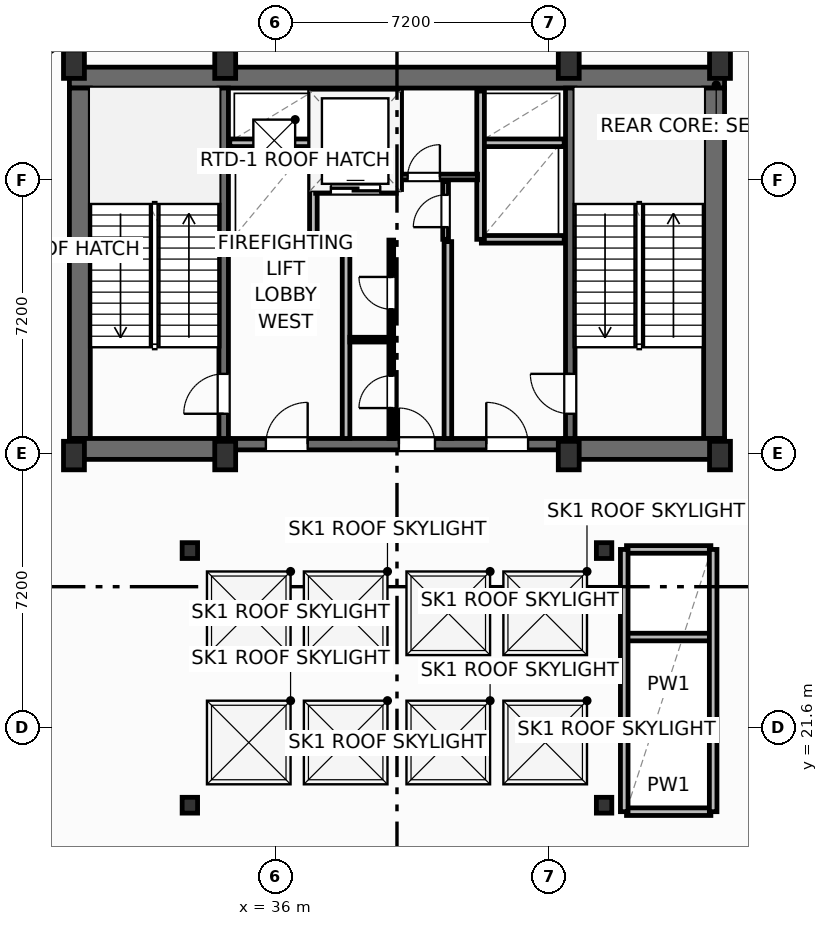
"""IFC4 building model, lengths in metres.
Left out: names, types, materials, properties, quantities, classifications, styles, units other than length and angle.
Written with IfcOpenShell. Run it as: python <this file> out.ifc"""

import sys

from ifc_helpers import new_model, si_unit, direction, frame, frame_2d, origin, origin_2d, place, context, subcontext, project, spatial, rectangle, i_section, extrude, element, fill, save


model = new_model("IFC4")
c1 = context("Model", 3, precision=1e-05, world=origin(), true_north=direction((0.0, 1.0)))
c2 = subcontext(c1, "Body", "Model", "MODEL_VIEW")
j1 = project(units=[si_unit("LENGTHUNIT", "METRE"), si_unit("PLANEANGLEUNIT", "RADIAN")], contexts=[c1])
p1 = place(None, origin())
s1 = spatial("IfcSite", under=j1, at=p1, CompositionType="ELEMENT")
p2 = place(p1, origin())
s2 = spatial("IfcBuilding", under=s1, at=p2, CompositionType="ELEMENT")
p3 = place(p2, frame((0.0, 0.0, 301.1)))
s3 = spatial("IfcBuildingStorey", under=s2, at=p3, CompositionType="ELEMENT", Elevation=301.1)
for number, where, z_axis, x_axis in (
    (1, (30.7, 28.75, 0.0), (0.0, 0.0, 1.0), (1.0, 0.0, 0.0)),
    (2, (34.68, 28.75, 0.0), (0.0, 0.0, 1.0), (1.0, 0.0, 0.0)),
    (3, (43.72, 28.75, 0.0), (0.0, 0.0, 1.0), (1.0, 0.0, 0.0)),
    (4, (47.7, 28.75, 0.0), (0.0, 0.0, 1.0), (1.0, 0.0, 0.0)),
    (5, (30.7, 39.05, 0.0), (0.0, 0.0, 1.0), (1.0, 0.0, 0.0)),
    (6, (34.68, 39.05, 0.0), (0.0, 0.0, 1.0), (1.0, 0.0, 0.0)),
    (7, (43.72, 39.05, 0.0), (0.0, 0.0, 1.0), (1.0, 0.0, 0.0)),
    (8, (47.7, 39.05, 0.0), (0.0, 0.0, 1.0), (1.0, 0.0, 0.0)),
):
    element("IfcColumn", number, at=place(p3, frame(where, z_axis=z_axis, x_axis=x_axis)), inside=s3, PredefinedType="COLUMN", context=c2, shape_type="SweptSolid", body=[
        extrude(rectangle(XDim=0.55, YDim=0.75, at=origin_2d()), origin(), (0.0, 0.0, 1.0), 4.8),
    ])
for number, where, z_axis, x_axis in (
    (9, (33.75, 19.55, 0.0), (0.0, 0.0, 1.0), (1.0, 0.0, 0.0)),
    (10, (44.65, 19.55, 0.0), (0.0, 0.0, 1.0), (1.0, 0.0, 0.0)),
    (11, (33.75, 26.25, 0.0), (0.0, 0.0, 1.0), (1.0, 0.0, 0.0)),
    (12, (44.65, 26.25, 0.0), (0.0, 0.0, 1.0), (1.0, 0.0, 0.0)),
):
    element("IfcColumn", number, at=place(p3, frame(where, z_axis=z_axis, x_axis=x_axis)), inside=s3, PredefinedType="COLUMN", context=c2, shape_type="SweptSolid", body=[
        extrude(i_section(OverallWidth=0.406, OverallDepth=0.416, WebThickness=0.03, FlangeThickness=0.048, FilletRadius=0.025, at=origin_2d()), origin(), (0.0, 0.0, 1.0), 4.8),
    ])
p4 = place(p3, frame((30.58, 38.695, 0.0), z_axis=(0.0, 0.0, 1.0), x_axis=(1.0, 0.0, 0.0)))
e13 = element("IfcWall", 13, at=p4, inside=s3, PredefinedType="SHEAR", context=c2, shape_type="SweptSolid", body=[
    extrude(rectangle(XDim=17.24, YDim=0.55, at=frame_2d((8.62, 0.0))), origin(), (0.0, 0.0, 1.0), 4.55),
])
for number, where, z_axis, x_axis in (
    (14, (30.855, 29.2, 0.0), (0.0, 0.0, 1.0), (0.0, 1.0, 0.0)),
    (15, (47.545, 29.2, 0.0), (0.0, 0.0, 1.0), (0.0, 1.0, 0.0)),
):
    element("IfcWall", number, at=place(p3, frame(where, z_axis=z_axis, x_axis=x_axis)), inside=s3, PredefinedType="SHEAR", context=c2, shape_type="SweptSolid", body=[
        extrude(rectangle(XDim=9.22, YDim=0.55, at=frame_2d((4.61, 0.0))), origin(), (0.0, 0.0, 1.0), 4.55),
    ])
for number, where, z_axis, x_axis in (
    (16, (30.58, 28.925, 0.0), (0.0, 0.0, 1.0), (1.0, 0.0, 0.0)),
    (17, (43.6, 28.925, 0.0), (0.0, 0.0, 1.0), (1.0, 0.0, 0.0)),
):
    element("IfcWall", number, at=place(p3, frame(where, z_axis=z_axis, x_axis=x_axis)), inside=s3, PredefinedType="SHEAR", context=c2, shape_type="SweptSolid", body=[
        extrude(rectangle(XDim=4.22, YDim=0.55, at=frame_2d((2.11, 0.0))), origin(), (0.0, 0.0, 1.0), 4.55),
    ])
p5 = place(p3, frame((34.8, 29.05, 0.0), z_axis=(0.0, 0.0, 1.0), x_axis=(1.0, 0.0, 0.0)))
e18 = element("IfcWall", 18, at=p5, inside=s3, PredefinedType="SHEAR", context=c2, shape_type="SweptSolid", body=[
    extrude(rectangle(XDim=8.8, YDim=0.3, at=frame_2d((4.4, 0.0))), origin(), (0.0, 0.0, 1.0), 4.55),
])
p6 = place(p5, frame((0.95, 0.0, 0.0)))
e19 = element("IfcOpeningElement", 19, at=p6, cuts=e18, PredefinedType="OPENING", context=c2, shape_type="SweptSolid", body=[
    extrude(rectangle(XDim=1.1, YDim=2.15, at=frame_2d((0.55, 1.075))), frame((0.0, 0.16, 0.0), z_axis=(0.0, -1.0, 0.0), x_axis=(1.0, 0.0, 0.0)), (0.0, 0.0, 1.0), 0.32),
])
p7 = place(p5, frame((6.75, 0.0, 0.0)))
e20 = element("IfcOpeningElement", 20, at=p7, cuts=e18, PredefinedType="OPENING", context=c2, shape_type="SweptSolid", body=[
    extrude(rectangle(XDim=1.1, YDim=2.15, at=frame_2d((0.55, 1.075))), frame((0.0, 0.16, 0.0), z_axis=(0.0, -1.0, 0.0), x_axis=(1.0, 0.0, 0.0)), (0.0, 0.0, 1.0), 0.32),
])
p8 = place(p5, frame((4.45, 0.0, 0.0)))
e21 = element("IfcOpeningElement", 21, at=p8, cuts=e18, PredefinedType="OPENING", context=c2, shape_type="SweptSolid", body=[
    extrude(rectangle(XDim=0.95, YDim=2.15, at=frame_2d((0.475, 1.075))), frame((0.0, 0.16, 0.0), z_axis=(0.0, -1.0, 0.0), x_axis=(1.0, 0.0, 0.0)), (0.0, 0.0, 1.0), 0.32),
])
p9 = place(p3, frame((34.64, 29.2, 0.0), z_axis=(0.0, 0.0, 1.0), x_axis=(0.0, 1.0, 0.0)))
e22 = element("IfcWall", 22, at=p9, inside=s3, PredefinedType="SHEAR", context=c2, shape_type="SweptSolid", body=[
    extrude(rectangle(XDim=9.22, YDim=0.25, at=frame_2d((4.61, 0.0))), origin(), (0.0, 0.0, 1.0), 4.55),
])
p10 = place(p9, frame((0.65, 0.0, 0.0)))
e23 = element("IfcOpeningElement", 23, at=p10, cuts=e22, PredefinedType="OPENING", context=c2, shape_type="SweptSolid", body=[
    extrude(rectangle(XDim=1.05, YDim=2.15, at=frame_2d((0.525, 1.075))), frame((0.0, 0.135, 0.0), z_axis=(0.0, -1.0, 0.0), x_axis=(1.0, 0.0, 0.0)), (0.0, 0.0, 1.0), 0.27),
])
p11 = place(p3, frame((43.76, 29.2, 0.0), z_axis=(0.0, 0.0, 1.0), x_axis=(0.0, 1.0, 0.0)))
e24 = element("IfcWall", 24, at=p11, inside=s3, PredefinedType="SHEAR", context=c2, shape_type="SweptSolid", body=[
    extrude(rectangle(XDim=9.22, YDim=0.25, at=frame_2d((4.61, 0.0))), origin(), (0.0, 0.0, 1.0), 4.55),
])
p12 = place(p11, frame((0.65, 0.0, 0.0)))
e25 = element("IfcOpeningElement", 25, at=p12, cuts=e24, PredefinedType="OPENING", context=c2, shape_type="SweptSolid", body=[
    extrude(rectangle(XDim=1.05, YDim=2.15, at=frame_2d((0.525, 1.075))), frame((0.0, 0.135, 0.0), z_axis=(0.0, -1.0, 0.0), x_axis=(1.0, 0.0, 0.0)), (0.0, 0.0, 1.0), 0.27),
])
p13 = place(p3, frame((33.952, 1.188, 0.0), z_axis=(0.0, 0.0, 1.0), x_axis=(0.823534980344, 0.567265490005, 0.0)))
e26 = element("IfcWall", 26, at=p13, inside=s3, PredefinedType="SOLIDWALL", context=c2, shape_type="SweptSolid", body=[
    extrude(rectangle(XDim=36.01, YDim=0.24, at=frame_2d((18.005, 0.0))), origin(), (0.0, 0.0, 1.0), 3.83),
])
p14 = place(p3, frame((44.448, 49.412, 0.0), z_axis=(0.0, 0.0, 1.0), x_axis=(-0.823531813074, -0.567270088102, 0.0)))
e27 = element("IfcWall", 27, at=p14, inside=s3, PredefinedType="SOLIDWALL", context=c2, shape_type="SweptSolid", body=[
    extrude(rectangle(XDim=36.01, YDim=0.24, at=frame_2d((18.005, 0.0))), origin(), (0.0, 0.0, 1.0), 3.83),
])
for number, where, z_axis, x_axis in (
    (28, (37.86, 29.2, 0.0), (0.0, 0.0, 1.0), (0.0, 1.0, 0.0)),
    (29, (40.54, 29.2, 0.0), (0.0, 0.0, 1.0), (0.0, 1.0, 0.0)),
):
    element("IfcWall", number, at=place(p3, frame(where, z_axis=z_axis, x_axis=x_axis)), inside=s3, PredefinedType="PARTITIONING", context=c2, shape_type="SweptSolid", body=[
        extrude(rectangle(XDim=5.18, YDim=0.2, at=frame_2d((2.59, 0.0))), origin(), (0.0, 0.0, 1.0), 4.55),
    ])
for number, where, z_axis, x_axis in (
    (30, (34.8, 34.44, 0.0), (0.0, 0.0, 1.0), (1.0, 0.0, 0.0)),
    (31, (34.8, 36.98, 0.0), (0.0, 0.0, 1.0), (1.0, 0.0, 0.0)),
):
    element("IfcWall", number, at=place(p3, frame(where, z_axis=z_axis, x_axis=x_axis)), inside=s3, PredefinedType="PARTITIONING", context=c2, shape_type="SweptSolid", body=[
        extrude(rectangle(XDim=2.18, YDim=0.2, at=frame_2d((1.09, 0.0))), origin(), (0.0, 0.0, 1.0), 4.55),
    ])
p15 = place(p3, frame((37.0, 34.44, 0.0), z_axis=(0.0, 0.0, 1.0), x_axis=(0.0, 1.0, 0.0)))
e32 = element("IfcWall", 32, at=p15, inside=s3, PredefinedType="PARTITIONING", context=c2, shape_type="SweptSolid", body=[
    extrude(rectangle(XDim=3.9, YDim=0.2, at=frame_2d((1.95, 0.0))), origin(), (0.0, 0.0, 1.0), 4.55),
])
for number, where, z_axis, x_axis in (
    (33, (41.42, 34.44, 0.0), (0.0, 0.0, 1.0), (1.0, 0.0, 0.0)),
    (34, (41.42, 36.98, 0.0), (0.0, 0.0, 1.0), (1.0, 0.0, 0.0)),
):
    element("IfcWall", number, at=place(p3, frame(where, z_axis=z_axis, x_axis=x_axis)), inside=s3, PredefinedType="PARTITIONING", context=c2, shape_type="SweptSolid", body=[
        extrude(rectangle(XDim=2.18, YDim=0.2, at=frame_2d((1.09, 0.0))), origin(), (0.0, 0.0, 1.0), 4.55),
    ])
p16 = place(p3, frame((41.4, 34.44, 0.0), z_axis=(0.0, 0.0, 1.0), x_axis=(0.0, 1.0, 0.0)))
e35 = element("IfcWall", 35, at=p16, inside=s3, PredefinedType="PARTITIONING", context=c2, shape_type="SweptSolid", body=[
    extrude(rectangle(XDim=3.9, YDim=0.2, at=frame_2d((1.95, 0.0))), origin(), (0.0, 0.0, 1.0), 4.55),
])
p17 = place(p3, frame((37.06, 35.75, 0.0), z_axis=(0.0, 0.0, 1.0), x_axis=(1.0, 0.0, 0.0)))
e36 = element("IfcWall", 36, at=p17, inside=s3, PredefinedType="PARTITIONING", context=c2, shape_type="SweptSolid", body=[
    extrude(rectangle(XDim=2.12, YDim=0.2, at=frame_2d((1.06, 0.0))), origin(), (0.0, 0.0, 1.0), 4.55),
])
p18 = place(p17, frame((0.4, 0.0, 0.0)))
e37 = element("IfcOpeningElement", 37, at=p18, cuts=e36, PredefinedType="OPENING", context=c2, shape_type="SweptSolid", body=[
    extrude(rectangle(XDim=1.3, YDim=2.2, at=frame_2d((0.65, 1.1))), frame((0.0, 0.11, 0.0), z_axis=(0.0, -1.0, 0.0), x_axis=(1.0, 0.0, 0.0)), (0.0, 0.0, 1.0), 0.22),
])
p19 = place(p3, frame((39.22, 35.75, 0.0), z_axis=(0.0, 0.0, 1.0), x_axis=(0.0, 1.0, 0.0)))
e38 = element("IfcWall", 38, at=p19, inside=s3, PredefinedType="PARTITIONING", context=c2, shape_type="SweptSolid", body=[
    extrude(rectangle(XDim=2.59, YDim=0.2, at=frame_2d((1.295, 0.0))), origin(), (0.0, 0.0, 1.0), 4.55),
])
p20 = place(p3, frame((39.3, 36.08, 0.0), z_axis=(0.0, 0.0, 1.0), x_axis=(1.0, 0.0, 0.0)))
e39 = element("IfcWall", 39, at=p20, inside=s3, PredefinedType="PARTITIONING", context=c2, shape_type="SweptSolid", body=[
    extrude(rectangle(XDim=2.02, YDim=0.15, at=frame_2d((1.01, 0.0))), origin(), (0.0, 0.0, 1.0), 4.55),
])
p21 = place(p20, frame((0.18, 0.0, 0.0)))
e40 = element("IfcOpeningElement", 40, at=p21, cuts=e39, PredefinedType="OPENING", context=c2, shape_type="SweptSolid", body=[
    extrude(rectangle(XDim=0.85, YDim=2.05, at=frame_2d((0.425, 1.025))), frame((0.0, 0.085, 0.0), z_axis=(0.0, -1.0, 0.0), x_axis=(1.0, 0.0, 0.0)), (0.0, 0.0, 1.0), 0.17),
])
p22 = place(p3, frame((40.48, 34.44, 0.0), z_axis=(0.0, 0.0, 1.0), x_axis=(0.0, 1.0, 0.0)))
e41 = element("IfcWall", 41, at=p22, inside=s3, PredefinedType="PARTITIONING", context=c2, shape_type="SweptSolid", body=[
    extrude(rectangle(XDim=1.52, YDim=0.15, at=frame_2d((0.76, 0.0))), origin(), (0.0, 0.0, 1.0), 4.55),
])
p23 = place(p22, frame((0.32, 0.0, 0.0)))
e42 = element("IfcOpeningElement", 42, at=p23, cuts=e41, PredefinedType="OPENING", context=c2, shape_type="SweptSolid", body=[
    extrude(rectangle(XDim=0.85, YDim=2.05, at=frame_2d((0.425, 1.025))), frame((0.0, 0.085, 0.0), z_axis=(0.0, -1.0, 0.0), x_axis=(1.0, 0.0, 0.0)), (0.0, 0.0, 1.0), 0.17),
])
p24 = place(p3, frame((37.96, 31.8, 0.0), z_axis=(0.0, 0.0, 1.0), x_axis=(1.0, 0.0, 0.0)))
e43 = element("IfcWall", 43, at=p24, inside=s3, PredefinedType="PARTITIONING", context=c2, shape_type="SweptSolid", body=[
    extrude(rectangle(XDim=1.09, YDim=0.125, at=frame_2d((0.545, 0.0))), origin(), (0.0, 0.0, 1.0), 4.55),
])
p25 = place(p3, frame((39.05, 29.2, 0.0), z_axis=(0.0, 0.0, 1.0), x_axis=(0.0, 1.0, 0.0)))
e44 = element("IfcWall", 44, at=p25, inside=s3, PredefinedType="PARTITIONING", context=c2, shape_type="SweptSolid", body=[
    extrude(rectangle(XDim=5.22, YDim=0.125, at=frame_2d((2.61, 0.0))), origin(), (0.0, 0.0, 1.0), 4.55),
])
p26 = place(p25, frame((0.8, 0.0, 0.0)))
e45 = element("IfcOpeningElement", 45, at=p26, cuts=e44, PredefinedType="OPENING", context=c2, shape_type="SweptSolid", body=[
    extrude(rectangle(XDim=0.85, YDim=2.05, at=frame_2d((0.425, 1.025))), frame((0.0, 0.073, 0.0), z_axis=(0.0, -1.0, 0.0), x_axis=(1.0, 0.0, 0.0)), (0.0, 0.0, 1.0), 0.145),
])
p27 = place(p25, frame((3.4, 0.0, 0.0)))
e46 = element("IfcOpeningElement", 46, at=p27, cuts=e44, PredefinedType="OPENING", context=c2, shape_type="SweptSolid", body=[
    extrude(rectangle(XDim=0.85, YDim=2.05, at=frame_2d((0.425, 1.025))), frame((0.0, 0.073, 0.0), z_axis=(0.0, -1.0, 0.0), x_axis=(1.0, 0.0, 0.0)), (0.0, 0.0, 1.0), 0.145),
])
for number, where, z_axis, x_axis in (
    (47, (45.24, 21.675, 0.0), (0.0, 0.0, 1.0), (1.0, 0.0, 0.0)),
    (48, (45.24, 23.975, 0.0), (0.0, 0.0, 1.0), (1.0, 0.0, 0.0)),
    (49, (45.24, 19.38, 0.0), (0.0, 0.0, 1.0), (1.0, 0.0, 0.0)),
    (50, (45.24, 26.28, 0.0), (0.0, 0.0, 1.0), (1.0, 0.0, 0.0)),
):
    element("IfcWall", number, at=place(p3, frame(where, z_axis=z_axis, x_axis=x_axis)), inside=s3, PredefinedType="PARTITIONING", context=c2, shape_type="SweptSolid", body=[
        extrude(rectangle(XDim=2.22, YDim=0.2, at=frame_2d((1.11, 0.0))), origin(), (0.0, 0.0, 1.0), 4.55),
    ])
for number, where, z_axis, x_axis in (
    (51, (45.18, 19.38, 0.0), (0.0, 0.0, 1.0), (0.0, 1.0, 0.0)),
    (52, (47.52, 19.38, 0.0), (0.0, 0.0, 1.0), (0.0, 1.0, 0.0)),
):
    element("IfcWall", number, at=place(p3, frame(where, z_axis=z_axis, x_axis=x_axis)), inside=s3, PredefinedType="PARTITIONING", context=c2, shape_type="SweptSolid", body=[
        extrude(rectangle(XDim=6.9, YDim=0.2, at=frame_2d((3.45, 0.0))), origin(), (0.0, 0.0, 1.0), 4.55),
    ])
p28 = place(p3, frame((0.0, 0.0, -0.25)))
p29 = place(p28, frame((35.3, 21.2, 0.0)))
p30 = place(p29, frame((0.0, 0.0, 0.2)))
e53 = element("IfcWindow", 53, at=p30, inside=s3, PartitioningType="SINGLE_PANEL", PredefinedType="SKYLIGHT", context=c2, shape_type="SweptSolid", body=[
    extrude(rectangle(XDim=2.2, YDim=2.2, at=origin_2d()), origin(), (0.0, 0.0, 1.0), 0.05),
])
p31 = place(p28, frame((37.85, 21.2, 0.0)))
p32 = place(p31, frame((0.0, 0.0, 0.2)))
e54 = element("IfcWindow", 54, at=p32, inside=s3, PartitioningType="SINGLE_PANEL", PredefinedType="SKYLIGHT", context=c2, shape_type="SweptSolid", body=[
    extrude(rectangle(XDim=2.2, YDim=2.2, at=origin_2d()), origin(), (0.0, 0.0, 1.0), 0.05),
])
p33 = place(p28, frame((40.55, 21.2, 0.0)))
p34 = place(p33, frame((0.0, 0.0, 0.2)))
e55 = element("IfcWindow", 55, at=p34, inside=s3, PartitioningType="SINGLE_PANEL", PredefinedType="SKYLIGHT", context=c2, shape_type="SweptSolid", body=[
    extrude(rectangle(XDim=2.2, YDim=2.2, at=origin_2d()), origin(), (0.0, 0.0, 1.0), 0.05),
])
p35 = place(p28, frame((43.1, 21.2, 0.0)))
p36 = place(p35, frame((0.0, 0.0, 0.2)))
e56 = element("IfcWindow", 56, at=p36, inside=s3, PartitioningType="SINGLE_PANEL", PredefinedType="SKYLIGHT", context=c2, shape_type="SweptSolid", body=[
    extrude(rectangle(XDim=2.2, YDim=2.2, at=origin_2d()), origin(), (0.0, 0.0, 1.0), 0.05),
])
p37 = place(p28, frame((35.3, 24.6, 0.0)))
p38 = place(p37, frame((0.0, 0.0, 0.2)))
e57 = element("IfcWindow", 57, at=p38, inside=s3, PartitioningType="SINGLE_PANEL", PredefinedType="SKYLIGHT", context=c2, shape_type="SweptSolid", body=[
    extrude(rectangle(XDim=2.2, YDim=2.2, at=origin_2d()), origin(), (0.0, 0.0, 1.0), 0.05),
])
p39 = place(p28, frame((37.85, 24.6, 0.0)))
p40 = place(p39, frame((0.0, 0.0, 0.2)))
e58 = element("IfcWindow", 58, at=p40, inside=s3, PartitioningType="SINGLE_PANEL", PredefinedType="SKYLIGHT", context=c2, shape_type="SweptSolid", body=[
    extrude(rectangle(XDim=2.2, YDim=2.2, at=origin_2d()), origin(), (0.0, 0.0, 1.0), 0.05),
])
p41 = place(p28, frame((40.55, 24.6, 0.0)))
p42 = place(p41, frame((0.0, 0.0, 0.2)))
e59 = element("IfcWindow", 59, at=p42, inside=s3, PartitioningType="SINGLE_PANEL", PredefinedType="SKYLIGHT", context=c2, shape_type="SweptSolid", body=[
    extrude(rectangle(XDim=2.2, YDim=2.2, at=origin_2d()), origin(), (0.0, 0.0, 1.0), 0.05),
])
p43 = place(p28, frame((43.1, 24.6, 0.0)))
p44 = place(p43, frame((0.0, 0.0, 0.2)))
e60 = element("IfcWindow", 60, at=p44, inside=s3, PartitioningType="SINGLE_PANEL", PredefinedType="SKYLIGHT", context=c2, shape_type="SweptSolid", body=[
    extrude(rectangle(XDim=2.2, YDim=2.2, at=origin_2d()), origin(), (0.0, 0.0, 1.0), 0.05),
])
p45 = place(p28, frame((35.97, 37.04, 0.0)))
p46 = place(p45, frame((0.0, 0.0, 0.2)))
e61 = element("IfcDoor", 61, at=p46, inside=s3, OperationType="SINGLE_SWING_LEFT", PredefinedType="TRAPDOOR", context=c2, shape_type="SweptSolid", body=[
    extrude(rectangle(XDim=1.1, YDim=1.1, at=origin_2d()), origin(), (0.0, 0.0, 1.0), 0.05),
])
p47 = place(p10, origin())
e62 = element("IfcDoor", 62, at=p47, inside=s3, OperationType="SINGLE_SWING_LEFT", PredefinedType="DOOR", context=c2, shape_type="SweptSolid", body=[
    extrude(rectangle(XDim=1.05, YDim=2.15, at=frame_2d((0.525, 1.075))), frame((0.0, 0.025, 0.0), z_axis=(0.0, -1.0, 0.0), x_axis=(1.0, 0.0, 0.0)), (0.0, 0.0, 1.0), 0.05),
])
fill(e23, e62)
p48 = place(p12, origin())
e63 = element("IfcDoor", 63, at=p48, inside=s3, OperationType="SINGLE_SWING_RIGHT", PredefinedType="DOOR", context=c2, shape_type="SweptSolid", body=[
    extrude(rectangle(XDim=1.05, YDim=2.15, at=frame_2d((0.525, 1.075))), frame((0.0, 0.025, 0.0), z_axis=(0.0, -1.0, 0.0), x_axis=(1.0, 0.0, 0.0)), (0.0, 0.0, 1.0), 0.05),
])
fill(e25, e63)
p49 = place(p6, origin())
e64 = element("IfcDoor", 64, at=p49, inside=s3, OperationType="SINGLE_SWING_RIGHT", PredefinedType="DOOR", context=c2, shape_type="SweptSolid", body=[
    extrude(rectangle(XDim=1.1, YDim=2.15, at=frame_2d((0.55, 1.075))), frame((0.0, 0.025, 0.0), z_axis=(0.0, -1.0, 0.0), x_axis=(1.0, 0.0, 0.0)), (0.0, 0.0, 1.0), 0.05),
])
fill(e19, e64)
p50 = place(p7, origin())
e65 = element("IfcDoor", 65, at=p50, inside=s3, OperationType="SINGLE_SWING_LEFT", PredefinedType="DOOR", context=c2, shape_type="SweptSolid", body=[
    extrude(rectangle(XDim=1.1, YDim=2.15, at=frame_2d((0.55, 1.075))), frame((0.0, 0.025, 0.0), z_axis=(0.0, -1.0, 0.0), x_axis=(1.0, 0.0, 0.0)), (0.0, 0.0, 1.0), 0.05),
])
fill(e20, e65)
p51 = place(p18, origin())
e66 = element("IfcDoor", 66, at=p51, inside=s3, OperationType="SLIDING_TO_LEFT", PredefinedType="DOOR", context=c2, shape_type="SweptSolid", body=[
    extrude(rectangle(XDim=1.3, YDim=2.2, at=frame_2d((0.65, 1.1))), frame((0.0, 0.025, 0.0), z_axis=(0.0, -1.0, 0.0), x_axis=(1.0, 0.0, 0.0)), (0.0, 0.0, 1.0), 0.05),
])
fill(e37, e66)
p52 = place(p21, origin())
e67 = element("IfcDoor", 67, at=p52, inside=s3, OperationType="SINGLE_SWING_RIGHT", PredefinedType="DOOR", context=c2, shape_type="SweptSolid", body=[
    extrude(rectangle(XDim=0.85, YDim=2.05, at=frame_2d((0.425, 1.025))), frame((0.0, 0.025, 0.0), z_axis=(0.0, -1.0, 0.0), x_axis=(1.0, 0.0, 0.0)), (0.0, 0.0, 1.0), 0.05),
])
fill(e40, e67)
p53 = place(p23, origin())
e68 = element("IfcDoor", 68, at=p53, inside=s3, OperationType="SINGLE_SWING_LEFT", PredefinedType="DOOR", context=c2, shape_type="SweptSolid", body=[
    extrude(rectangle(XDim=0.85, YDim=2.05, at=frame_2d((0.425, 1.025))), frame((0.0, 0.025, 0.0), z_axis=(0.0, -1.0, 0.0), x_axis=(1.0, 0.0, 0.0)), (0.0, 0.0, 1.0), 0.05),
])
fill(e42, e68)
p54 = place(p26, origin())
e69 = element("IfcDoor", 69, at=p54, inside=s3, OperationType="SINGLE_SWING_LEFT", PredefinedType="DOOR", context=c2, shape_type="SweptSolid", body=[
    extrude(rectangle(XDim=0.85, YDim=2.05, at=frame_2d((0.425, 1.025))), frame((0.0, 0.025, 0.0), z_axis=(0.0, -1.0, 0.0), x_axis=(1.0, 0.0, 0.0)), (0.0, 0.0, 1.0), 0.05),
])
fill(e45, e69)
p55 = place(p27, origin())
e70 = element("IfcDoor", 70, at=p55, inside=s3, OperationType="SINGLE_SWING_RIGHT", PredefinedType="DOOR", context=c2, shape_type="SweptSolid", body=[
    extrude(rectangle(XDim=0.85, YDim=2.05, at=frame_2d((0.425, 1.025))), frame((0.0, 0.025, 0.0), z_axis=(0.0, -1.0, 0.0), x_axis=(1.0, 0.0, 0.0)), (0.0, 0.0, 1.0), 0.05),
])
fill(e46, e70)
p56 = place(p8, origin())
e71 = element("IfcDoor", 71, at=p56, inside=s3, OperationType="SINGLE_SWING_LEFT", PredefinedType="DOOR", context=c2, shape_type="SweptSolid", body=[
    extrude(rectangle(XDim=0.95, YDim=2.15, at=frame_2d((0.475, 1.075))), frame((0.0, 0.025, 0.0), z_axis=(0.0, -1.0, 0.0), x_axis=(1.0, 0.0, 0.0)), (0.0, 0.0, 1.0), 0.05),
])
fill(e21, e71)
save(model, sys.argv[1])
